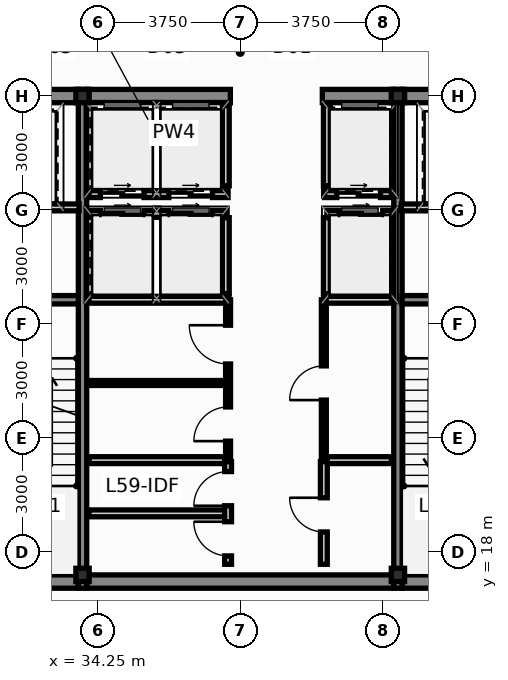
"""IFC4 building model, lengths in metres.
Left out: names, types, materials, properties, quantities, classifications, styles, units other than length and angle.
Written with IfcOpenShell. Run it as: python <this file> out.ifc"""

import sys

from ifc_helpers import new_model, si_unit, direction, frame, frame_2d, origin, origin_2d, place, context, subcontext, project, spatial, rectangle, hollow_rectangle, extrude, source, transform, mapped, element, fill, save


model = new_model("IFC4")
c1 = context("Model", 3, precision=1e-05, world=origin(), true_north=direction((0.0, 1.0)))
c2 = subcontext(c1, "Body", "Model", "MODEL_VIEW")
j1 = project(units=[si_unit("LENGTHUNIT", "METRE"), si_unit("PLANEANGLEUNIT", "RADIAN")], contexts=[c1])
p1 = place(None, origin())
s1 = spatial("IfcSite", under=j1, at=p1, CompositionType="ELEMENT")
p2 = place(p1, origin())
s2 = spatial("IfcBuilding", under=s1, at=p2, CompositionType="ELEMENT")
p3 = place(p2, frame((0.0, 0.0, 225.35)))
s3 = spatial("IfcBuildingStorey", under=s2, at=p3, CompositionType="ELEMENT", Elevation=225.35)
m1 = source(origin(), c2, "Body", "SweptSolid", [
    extrude(hollow_rectangle(XDim=0.35, YDim=0.35, WallThickness=0.016, at=origin_2d()), origin(), (0.0, 0.0, 1.0), 4.5),
])
for number, where, z_axis, x_axis in (
    (1, (33.85, 17.4, 0.0), (0.0, 0.0, 1.0), (1.0, 0.0, 0.0)),
    (2, (42.15, 17.4, 0.0), (0.0, 0.0, 1.0), (1.0, 0.0, 0.0)),
    (3, (33.85, 30.0, 0.0), (0.0, 0.0, 1.0), (1.0, 0.0, 0.0)),
    (4, (42.15, 30.0, 0.0), (0.0, 0.0, 1.0), (1.0, 0.0, 0.0)),
):
    element("IfcColumn", number, at=place(p3, frame(where, z_axis=z_axis, x_axis=x_axis)), inside=s3, PredefinedType="COLUMN", context=c2, shape_type="MappedRepresentation", body=[
        mapped(m1, transform((0.0, 0.0, 0.0), scale=1.0)),
    ])
p4 = place(p3, frame((30.84, 17.225, 0.0), z_axis=(0.0, 0.0, 1.0), x_axis=(1.0, 0.0, 0.0)))
e5 = element("IfcWall", 5, at=p4, inside=s3, PredefinedType="SHEAR", context=c2, shape_type="SweptSolid", body=[
    extrude(rectangle(XDim=2.9, YDim=0.35, at=frame_2d((1.45, 0.0))), origin(), (0.0, 0.0, 1.0), 4.5),
])
p5 = place(p3, frame((33.96, 17.225, 0.0), z_axis=(0.0, 0.0, 1.0), x_axis=(1.0, 0.0, 0.0)))
e6 = element("IfcWall", 6, at=p5, inside=s3, PredefinedType="SHEAR", context=c2, shape_type="SweptSolid", body=[
    extrude(rectangle(XDim=8.08, YDim=0.35, at=frame_2d((4.04, 0.0))), origin(), (0.0, 0.0, 1.0), 4.5),
])
for number, where, z_axis, x_axis in (
    (7, (42.26, 17.225, 0.0), (0.0, 0.0, 1.0), (1.0, 0.0, 0.0)),
    (8, (30.84, 30.0, 0.0), (0.0, 0.0, 1.0), (1.0, 0.0, 0.0)),
):
    element("IfcWall", number, at=place(p3, frame(where, z_axis=z_axis, x_axis=x_axis)), inside=s3, PredefinedType="SHEAR", context=c2, shape_type="SweptSolid", body=[
        extrude(rectangle(XDim=2.9, YDim=0.35, at=frame_2d((1.45, 0.0))), origin(), (0.0, 0.0, 1.0), 4.5),
    ])
p6 = place(p3, frame((33.96, 30.0, 0.0), z_axis=(0.0, 0.0, 1.0), x_axis=(1.0, 0.0, 0.0)))
e9 = element("IfcWall", 9, at=p6, inside=s3, PredefinedType="SHEAR", context=c2, shape_type="SweptSolid", body=[
    extrude(rectangle(XDim=3.78, YDim=0.35, at=frame_2d((1.89, 0.0))), origin(), (0.0, 0.0, 1.0), 4.5),
])
p7 = place(p3, frame((40.16, 30.0, 0.0), z_axis=(0.0, 0.0, 1.0), x_axis=(1.0, 0.0, 0.0)))
e10 = element("IfcWall", 10, at=p7, inside=s3, PredefinedType="SHEAR", context=c2, shape_type="SweptSolid", body=[
    extrude(rectangle(XDim=1.88, YDim=0.35, at=frame_2d((0.94, 0.0))), origin(), (0.0, 0.0, 1.0), 4.5),
])
p8 = place(p3, frame((42.26, 30.0, 0.0), z_axis=(0.0, 0.0, 1.0), x_axis=(1.0, 0.0, 0.0)))
e11 = element("IfcWall", 11, at=p8, inside=s3, PredefinedType="SHEAR", context=c2, shape_type="SweptSolid", body=[
    extrude(rectangle(XDim=2.9, YDim=0.35, at=frame_2d((1.45, 0.0))), origin(), (0.0, 0.0, 1.0), 4.5),
])
for number, where, z_axis, x_axis in (
    (12, (33.85, 17.05, 0.0), (0.0, 0.0, 1.0), (0.0, 1.0, 0.0)),
    (13, (42.15, 17.05, 0.0), (0.0, 0.0, 1.0), (0.0, 1.0, 0.0)),
):
    element("IfcWall", number, at=place(p3, frame(where, z_axis=z_axis, x_axis=x_axis)), inside=s3, PredefinedType="SHEAR", context=c2, shape_type="SweptSolid", body=[
        extrude(rectangle(XDim=13.125, YDim=0.22, at=frame_2d((6.562, 0.0))), origin(), (0.0, 0.0, 1.0), 4.5),
    ])
for number, where, z_axis, x_axis in (
    (14, (30.84, 24.64, 0.0), (0.0, 0.0, 1.0), (1.0, 0.0, 0.0)),
    (15, (42.26, 24.64, 0.0), (0.0, 0.0, 1.0), (1.0, 0.0, 0.0)),
):
    element("IfcWall", number, at=place(p3, frame(where, z_axis=z_axis, x_axis=x_axis)), inside=s3, PredefinedType="SHEAR", context=c2, shape_type="SweptSolid", body=[
        extrude(rectangle(XDim=2.9, YDim=0.22, at=frame_2d((1.45, 0.0))), origin(), (0.0, 0.0, 1.0), 4.5),
    ])
p9 = place(p3, frame((34.02, 26.9, 0.0), z_axis=(0.0, 0.0, 1.0), x_axis=(1.0, 0.0, 0.0)))
e16 = element("IfcWall", 16, at=p9, inside=s3, PredefinedType="PARTITIONING", context=c2, shape_type="SweptSolid", body=[
    extrude(rectangle(XDim=3.6, YDim=0.18, at=frame_2d((1.8, 0.0))), origin(), (0.0, 0.0, 1.0), 4.25),
])
p10 = place(p9, frame((0.3, 0.0, 0.0)))
e17 = element("IfcOpeningElement", 17, at=p10, cuts=e16, PredefinedType="OPENING", context=c2, shape_type="SweptSolid", body=[
    extrude(rectangle(XDim=1.15, YDim=2.2, at=frame_2d((0.575, 1.1))), frame((0.0, 0.102, 0.0), z_axis=(0.0, -1.0, 0.0), x_axis=(1.0, 0.0, 0.0)), (0.0, 0.0, 1.0), 0.204),
])
p11 = place(p9, frame((2.1, 0.0, 0.0)))
e18 = element("IfcOpeningElement", 18, at=p11, cuts=e16, PredefinedType="OPENING", context=c2, shape_type="SweptSolid", body=[
    extrude(rectangle(XDim=1.15, YDim=2.2, at=frame_2d((0.575, 1.1))), frame((0.0, 0.102, 0.0), z_axis=(0.0, -1.0, 0.0), x_axis=(1.0, 0.0, 0.0)), (0.0, 0.0, 1.0), 0.204),
])
p12 = place(p3, frame((40.28, 26.9, 0.0), z_axis=(0.0, 0.0, 1.0), x_axis=(1.0, 0.0, 0.0)))
e19 = element("IfcWall", 19, at=p12, inside=s3, PredefinedType="PARTITIONING", context=c2, shape_type="SweptSolid", body=[
    extrude(rectangle(XDim=1.7, YDim=0.18, at=frame_2d((0.85, 0.0))), origin(), (0.0, 0.0, 1.0), 4.25),
])
p13 = place(p12, frame((0.32, 0.0, 0.0)))
e20 = element("IfcOpeningElement", 20, at=p13, cuts=e19, PredefinedType="OPENING", context=c2, shape_type="SweptSolid", body=[
    extrude(rectangle(XDim=1.15, YDim=2.2, at=frame_2d((0.575, 1.1))), frame((0.0, 0.102, 0.0), z_axis=(0.0, -1.0, 0.0), x_axis=(1.0, 0.0, 0.0)), (0.0, 0.0, 1.0), 0.204),
])
for number, where, z_axis, x_axis in (
    (21, (37.62, 24.8, 0.0), (0.0, 0.0, 1.0), (0.0, 1.0, 0.0)),
    (22, (40.28, 24.8, 0.0), (0.0, 0.0, 1.0), (0.0, 1.0, 0.0)),
):
    element("IfcWall", number, at=place(p3, frame(where, z_axis=z_axis, x_axis=x_axis)), inside=s3, PredefinedType="PARTITIONING", context=c2, shape_type="SweptSolid", body=[
        extrude(rectangle(XDim=2.0, YDim=0.18, at=frame_2d((1.0, 0.0))), origin(), (0.0, 0.0, 1.0), 4.25),
    ])
p14 = place(p3, frame((34.02, 24.64, 0.0), z_axis=(0.0, 0.0, 1.0), x_axis=(1.0, 0.0, 0.0)))
e23 = element("IfcWall", 23, at=p14, inside=s3, PredefinedType="PARTITIONING", context=c2, shape_type="SweptSolid", body=[
    extrude(rectangle(XDim=3.68, YDim=0.18, at=frame_2d((1.84, 0.0))), origin(), (0.0, 0.0, 1.0), 4.25),
])
p15 = place(p3, frame((40.2, 24.64, 0.0), z_axis=(0.0, 0.0, 1.0), x_axis=(1.0, 0.0, 0.0)))
e24 = element("IfcWall", 24, at=p15, inside=s3, PredefinedType="PARTITIONING", context=c2, shape_type="SweptSolid", body=[
    extrude(rectangle(XDim=1.78, YDim=0.18, at=frame_2d((0.89, 0.0))), origin(), (0.0, 0.0, 1.0), 4.25),
])
p16 = place(p3, frame((34.02, 27.42, 0.0), z_axis=(0.0, 0.0, 1.0), x_axis=(1.0, 0.0, 0.0)))
e25 = element("IfcWall", 25, at=p16, inside=s3, PredefinedType="PARTITIONING", context=c2, shape_type="SweptSolid", body=[
    extrude(rectangle(XDim=3.66, YDim=0.18, at=frame_2d((1.83, 0.0))), origin(), (0.0, 0.0, 1.0), 4.25),
])
p17 = place(p16, frame((0.3, 0.0, 0.0)))
e26 = element("IfcOpeningElement", 26, at=p17, cuts=e25, PredefinedType="OPENING", context=c2, shape_type="SweptSolid", body=[
    extrude(rectangle(XDim=1.15, YDim=2.2, at=frame_2d((0.575, 1.1))), frame((0.0, 0.102, 0.0), z_axis=(0.0, -1.0, 0.0), x_axis=(1.0, 0.0, 0.0)), (0.0, 0.0, 1.0), 0.204),
])
p18 = place(p16, frame((2.1, 0.0, 0.0)))
e27 = element("IfcOpeningElement", 27, at=p18, cuts=e25, PredefinedType="OPENING", context=c2, shape_type="SweptSolid", body=[
    extrude(rectangle(XDim=1.15, YDim=2.2, at=frame_2d((0.575, 1.1))), frame((0.0, 0.102, 0.0), z_axis=(0.0, -1.0, 0.0), x_axis=(1.0, 0.0, 0.0)), (0.0, 0.0, 1.0), 0.204),
])
p19 = place(p3, frame((40.22, 27.42, 0.0), z_axis=(0.0, 0.0, 1.0), x_axis=(1.0, 0.0, 0.0)))
e28 = element("IfcWall", 28, at=p19, inside=s3, PredefinedType="PARTITIONING", context=c2, shape_type="SweptSolid", body=[
    extrude(rectangle(XDim=1.76, YDim=0.18, at=frame_2d((0.88, 0.0))), origin(), (0.0, 0.0, 1.0), 4.25),
])
p20 = place(p19, frame((0.32, 0.0, 0.0)))
e29 = element("IfcOpeningElement", 29, at=p20, cuts=e28, PredefinedType="OPENING", context=c2, shape_type="SweptSolid", body=[
    extrude(rectangle(XDim=1.15, YDim=2.2, at=frame_2d((0.575, 1.1))), frame((0.0, 0.102, 0.0), z_axis=(0.0, -1.0, 0.0), x_axis=(1.0, 0.0, 0.0)), (0.0, 0.0, 1.0), 0.204),
])
for number, where, z_axis, x_axis in (
    (30, (37.62, 27.64, 0.0), (0.0, 0.0, 1.0), (0.0, 1.0, 0.0)),
    (31, (40.28, 27.64, 0.0), (0.0, 0.0, 1.0), (0.0, 1.0, 0.0)),
):
    element("IfcWall", number, at=place(p3, frame(where, z_axis=z_axis, x_axis=x_axis)), inside=s3, PredefinedType="PARTITIONING", context=c2, shape_type="SweptSolid", body=[
        extrude(rectangle(XDim=2.11, YDim=0.18, at=frame_2d((1.055, 0.0))), origin(), (0.0, 0.0, 1.0), 4.25),
    ])
for number, where, z_axis, x_axis in (
    (32, (30.86, 27.07, 0.0), (0.0, 0.0, 1.0), (1.0, 0.0, 0.0)),
    (33, (42.24, 27.07, 0.0), (0.0, 0.0, 1.0), (1.0, 0.0, 0.0)),
):
    element("IfcWall", number, at=place(p3, frame(where, z_axis=z_axis, x_axis=x_axis)), inside=s3, PredefinedType="PARTITIONING", context=c2, shape_type="SweptSolid", body=[
        extrude(rectangle(XDim=2.9, YDim=0.18, at=frame_2d((1.45, 0.0))), origin(), (0.0, 0.0, 1.0), 4.25),
    ])
p21 = place(p3, frame((34.02, 20.42, 0.0), z_axis=(0.0, 0.0, 1.0), x_axis=(1.0, 0.0, 0.0)))
e34 = element("IfcWall", 34, at=p21, inside=s3, PredefinedType="PARTITIONING", context=c2, shape_type="SweptSolid", body=[
    extrude(rectangle(XDim=3.64, YDim=0.18, at=frame_2d((1.82, 0.0))), origin(), (0.0, 0.0, 1.0), 4.25),
])
p22 = place(p3, frame((40.22, 20.42, 0.0), z_axis=(0.0, 0.0, 1.0), x_axis=(1.0, 0.0, 0.0)))
e35 = element("IfcWall", 35, at=p22, inside=s3, PredefinedType="PARTITIONING", context=c2, shape_type="SweptSolid", body=[
    extrude(rectangle(XDim=1.76, YDim=0.18, at=frame_2d((0.88, 0.0))), origin(), (0.0, 0.0, 1.0), 4.25),
])
p23 = place(p3, frame((34.02, 22.45, 0.0), z_axis=(0.0, 0.0, 1.0), x_axis=(1.0, 0.0, 0.0)))
e36 = element("IfcWall", 36, at=p23, inside=s3, PredefinedType="PARTITIONING", context=c2, shape_type="SweptSolid", body=[
    extrude(rectangle(XDim=3.58, YDim=0.13, at=frame_2d((1.79, 0.0))), origin(), (0.0, 0.0, 1.0), 4.25),
])
p24 = place(p3, frame((37.68, 20.5, 0.0), z_axis=(0.0, 0.0, 1.0), x_axis=(0.0, 1.0, 0.0)))
e37 = element("IfcWall", 37, at=p24, inside=s3, PredefinedType="PARTITIONING", context=c2, shape_type="SweptSolid", body=[
    extrude(rectangle(XDim=4.14, YDim=0.13, at=frame_2d((2.07, 0.0))), origin(), (0.0, 0.0, 1.0), 4.25),
])
p25 = place(p24, frame((0.42, 0.0, 0.0)))
e38 = element("IfcOpeningElement", 38, at=p25, cuts=e37, PredefinedType="OPENING", context=c2, shape_type="SweptSolid", body=[
    extrude(rectangle(XDim=0.9, YDim=2.1, at=frame_2d((0.45, 1.05))), frame((0.0, 0.077, 0.0), z_axis=(0.0, -1.0, 0.0), x_axis=(1.0, 0.0, 0.0)), (0.0, 0.0, 1.0), 0.154),
])
p26 = place(p24, frame((2.45, 0.0, 0.0)))
e39 = element("IfcOpeningElement", 39, at=p26, cuts=e37, PredefinedType="OPENING", context=c2, shape_type="SweptSolid", body=[
    extrude(rectangle(XDim=1.02, YDim=2.15, at=frame_2d((0.51, 1.075))), frame((0.0, 0.077, 0.0), z_axis=(0.0, -1.0, 0.0), x_axis=(1.0, 0.0, 0.0)), (0.0, 0.0, 1.0), 0.154),
])
p27 = place(p3, frame((40.2, 20.5, 0.0), z_axis=(0.0, 0.0, 1.0), x_axis=(0.0, 1.0, 0.0)))
e40 = element("IfcWall", 40, at=p27, inside=s3, PredefinedType="PARTITIONING", context=c2, shape_type="SweptSolid", body=[
    extrude(rectangle(XDim=4.14, YDim=0.13, at=frame_2d((2.07, 0.0))), origin(), (0.0, 0.0, 1.0), 4.25),
])
p28 = place(p27, frame((1.5, 0.0, 0.0)))
e41 = element("IfcOpeningElement", 41, at=p28, cuts=e40, PredefinedType="OPENING", context=c2, shape_type="SweptSolid", body=[
    extrude(rectangle(XDim=0.9, YDim=2.1, at=frame_2d((0.45, 1.05))), frame((0.0, 0.077, 0.0), z_axis=(0.0, -1.0, 0.0), x_axis=(1.0, 0.0, 0.0)), (0.0, 0.0, 1.0), 0.154),
])
p29 = place(p3, frame((34.02, 19.02, 0.0), z_axis=(0.0, 0.0, 1.0), x_axis=(1.0, 0.0, 0.0)))
e42 = element("IfcWall", 42, at=p29, inside=s3, PredefinedType="PARTITIONING", context=c2, shape_type="SweptSolid", body=[
    extrude(rectangle(XDim=3.58, YDim=0.18, at=frame_2d((1.79, 0.0))), origin(), (0.0, 0.0, 1.0), 4.25),
])
p30 = place(p3, frame((37.68, 17.68, 0.0), z_axis=(0.0, 0.0, 1.0), x_axis=(0.0, 1.0, 0.0)))
e43 = element("IfcWall", 43, at=p30, inside=s3, PredefinedType="PARTITIONING", context=c2, shape_type="SweptSolid", body=[
    extrude(rectangle(XDim=2.7, YDim=0.18, at=frame_2d((1.35, 0.0))), origin(), (0.0, 0.0, 1.0), 4.25),
])
p31 = place(p30, frame((0.22, 0.0, 0.0)))
e44 = element("IfcOpeningElement", 44, at=p31, cuts=e43, PredefinedType="OPENING", context=c2, shape_type="SweptSolid", body=[
    extrude(rectangle(XDim=0.9, YDim=2.1, at=frame_2d((0.45, 1.05))), frame((0.0, 0.102, 0.0), z_axis=(0.0, -1.0, 0.0), x_axis=(1.0, 0.0, 0.0)), (0.0, 0.0, 1.0), 0.204),
])
p32 = place(p30, frame((1.54, 0.0, 0.0)))
e45 = element("IfcOpeningElement", 45, at=p32, cuts=e43, PredefinedType="OPENING", context=c2, shape_type="SweptSolid", body=[
    extrude(rectangle(XDim=0.9, YDim=2.1, at=frame_2d((0.45, 1.05))), frame((0.0, 0.102, 0.0), z_axis=(0.0, -1.0, 0.0), x_axis=(1.0, 0.0, 0.0)), (0.0, 0.0, 1.0), 0.204),
])
p33 = place(p3, frame((40.2, 17.68, 0.0), z_axis=(0.0, 0.0, 1.0), x_axis=(0.0, 1.0, 0.0)))
e46 = element("IfcWall", 46, at=p33, inside=s3, PredefinedType="PARTITIONING", context=c2, shape_type="SweptSolid", body=[
    extrude(rectangle(XDim=2.7, YDim=0.18, at=frame_2d((1.35, 0.0))), origin(), (0.0, 0.0, 1.0), 4.25),
])
p34 = place(p33, frame((0.85, 0.0, 0.0)))
e47 = element("IfcOpeningElement", 47, at=p34, cuts=e46, PredefinedType="OPENING", context=c2, shape_type="SweptSolid", body=[
    extrude(rectangle(XDim=0.9, YDim=2.1, at=frame_2d((0.45, 1.05))), frame((0.0, 0.102, 0.0), z_axis=(0.0, -1.0, 0.0), x_axis=(1.0, 0.0, 0.0)), (0.0, 0.0, 1.0), 0.204),
])
p35 = place(p10, origin())
e48 = element("IfcDoor", 48, at=p35, inside=s3, OperationType="SLIDING_TO_LEFT", PredefinedType="DOOR", context=c2, shape_type="SweptSolid", body=[
    extrude(rectangle(XDim=1.15, YDim=2.2, at=frame_2d((0.575, 1.1))), frame((0.0, 0.025, 0.0), z_axis=(0.0, -1.0, 0.0), x_axis=(1.0, 0.0, 0.0)), (0.0, 0.0, 1.0), 0.05),
])
fill(e17, e48)
p36 = place(p11, origin())
e49 = element("IfcDoor", 49, at=p36, inside=s3, OperationType="SLIDING_TO_RIGHT", PredefinedType="DOOR", context=c2, shape_type="SweptSolid", body=[
    extrude(rectangle(XDim=1.15, YDim=2.2, at=frame_2d((0.575, 1.1))), frame((0.0, 0.025, 0.0), z_axis=(0.0, -1.0, 0.0), x_axis=(1.0, 0.0, 0.0)), (0.0, 0.0, 1.0), 0.05),
])
fill(e18, e49)
p37 = place(p13, origin())
e50 = element("IfcDoor", 50, at=p37, inside=s3, OperationType="SLIDING_TO_LEFT", PredefinedType="DOOR", context=c2, shape_type="SweptSolid", body=[
    extrude(rectangle(XDim=1.15, YDim=2.2, at=frame_2d((0.575, 1.1))), frame((0.0, 0.025, 0.0), z_axis=(0.0, -1.0, 0.0), x_axis=(1.0, 0.0, 0.0)), (0.0, 0.0, 1.0), 0.05),
])
fill(e20, e50)
p38 = place(p17, origin())
e51 = element("IfcDoor", 51, at=p38, inside=s3, OperationType="SLIDING_TO_RIGHT", PredefinedType="DOOR", context=c2, shape_type="SweptSolid", body=[
    extrude(rectangle(XDim=1.15, YDim=2.2, at=frame_2d((0.575, 1.1))), frame((0.0, 0.025, 0.0), z_axis=(0.0, -1.0, 0.0), x_axis=(1.0, 0.0, 0.0)), (0.0, 0.0, 1.0), 0.05),
])
fill(e26, e51)
p39 = place(p18, origin())
e52 = element("IfcDoor", 52, at=p39, inside=s3, OperationType="SLIDING_TO_LEFT", PredefinedType="DOOR", context=c2, shape_type="SweptSolid", body=[
    extrude(rectangle(XDim=1.15, YDim=2.2, at=frame_2d((0.575, 1.1))), frame((0.0, 0.025, 0.0), z_axis=(0.0, -1.0, 0.0), x_axis=(1.0, 0.0, 0.0)), (0.0, 0.0, 1.0), 0.05),
])
fill(e27, e52)
p40 = place(p20, origin())
e53 = element("IfcDoor", 53, at=p40, inside=s3, OperationType="SLIDING_TO_RIGHT", PredefinedType="DOOR", context=c2, shape_type="SweptSolid", body=[
    extrude(rectangle(XDim=1.15, YDim=2.2, at=frame_2d((0.575, 1.1))), frame((0.0, 0.025, 0.0), z_axis=(0.0, -1.0, 0.0), x_axis=(1.0, 0.0, 0.0)), (0.0, 0.0, 1.0), 0.05),
])
fill(e29, e53)
p41 = place(p25, origin())
e54 = element("IfcDoor", 54, at=p41, inside=s3, OperationType="SINGLE_SWING_LEFT", PredefinedType="DOOR", context=c2, shape_type="SweptSolid", body=[
    extrude(rectangle(XDim=0.9, YDim=2.1, at=frame_2d((0.45, 1.05))), frame((0.0, 0.025, 0.0), z_axis=(0.0, -1.0, 0.0), x_axis=(1.0, 0.0, 0.0)), (0.0, 0.0, 1.0), 0.05),
])
fill(e38, e54)
p42 = place(p26, origin())
e55 = element("IfcDoor", 55, at=p42, inside=s3, OperationType="SINGLE_SWING_RIGHT", PredefinedType="DOOR", context=c2, shape_type="SweptSolid", body=[
    extrude(rectangle(XDim=1.02, YDim=2.15, at=frame_2d((0.51, 1.075))), frame((0.0, 0.025, 0.0), z_axis=(0.0, -1.0, 0.0), x_axis=(1.0, 0.0, 0.0)), (0.0, 0.0, 1.0), 0.05),
])
fill(e39, e55)
p43 = place(p28, origin())
e56 = element("IfcDoor", 56, at=p43, inside=s3, OperationType="SINGLE_SWING_LEFT", PredefinedType="DOOR", context=c2, shape_type="SweptSolid", body=[
    extrude(rectangle(XDim=0.9, YDim=2.1, at=frame_2d((0.45, 1.05))), frame((0.0, 0.025, 0.0), z_axis=(0.0, -1.0, 0.0), x_axis=(1.0, 0.0, 0.0)), (0.0, 0.0, 1.0), 0.05),
])
fill(e41, e56)
p44 = place(p31, origin())
e57 = element("IfcDoor", 57, at=p44, inside=s3, OperationType="SINGLE_SWING_RIGHT", PredefinedType="DOOR", context=c2, shape_type="SweptSolid", body=[
    extrude(rectangle(XDim=0.9, YDim=2.1, at=frame_2d((0.45, 1.05))), frame((0.0, 0.025, 0.0), z_axis=(0.0, -1.0, 0.0), x_axis=(1.0, 0.0, 0.0)), (0.0, 0.0, 1.0), 0.05),
])
fill(e44, e57)
p45 = place(p32, origin())
e58 = element("IfcDoor", 58, at=p45, inside=s3, OperationType="SINGLE_SWING_LEFT", PredefinedType="DOOR", context=c2, shape_type="SweptSolid", body=[
    extrude(rectangle(XDim=0.9, YDim=2.1, at=frame_2d((0.45, 1.05))), frame((0.0, 0.025, 0.0), z_axis=(0.0, -1.0, 0.0), x_axis=(1.0, 0.0, 0.0)), (0.0, 0.0, 1.0), 0.05),
])
fill(e45, e58)
p46 = place(p34, origin())
e59 = element("IfcDoor", 59, at=p46, inside=s3, OperationType="SINGLE_SWING_RIGHT", PredefinedType="DOOR", context=c2, shape_type="SweptSolid", body=[
    extrude(rectangle(XDim=0.9, YDim=2.1, at=frame_2d((0.45, 1.05))), frame((0.0, 0.025, 0.0), z_axis=(0.0, -1.0, 0.0), x_axis=(1.0, 0.0, 0.0)), (0.0, 0.0, 1.0), 0.05),
])
fill(e47, e59)
save(model, sys.argv[1])
